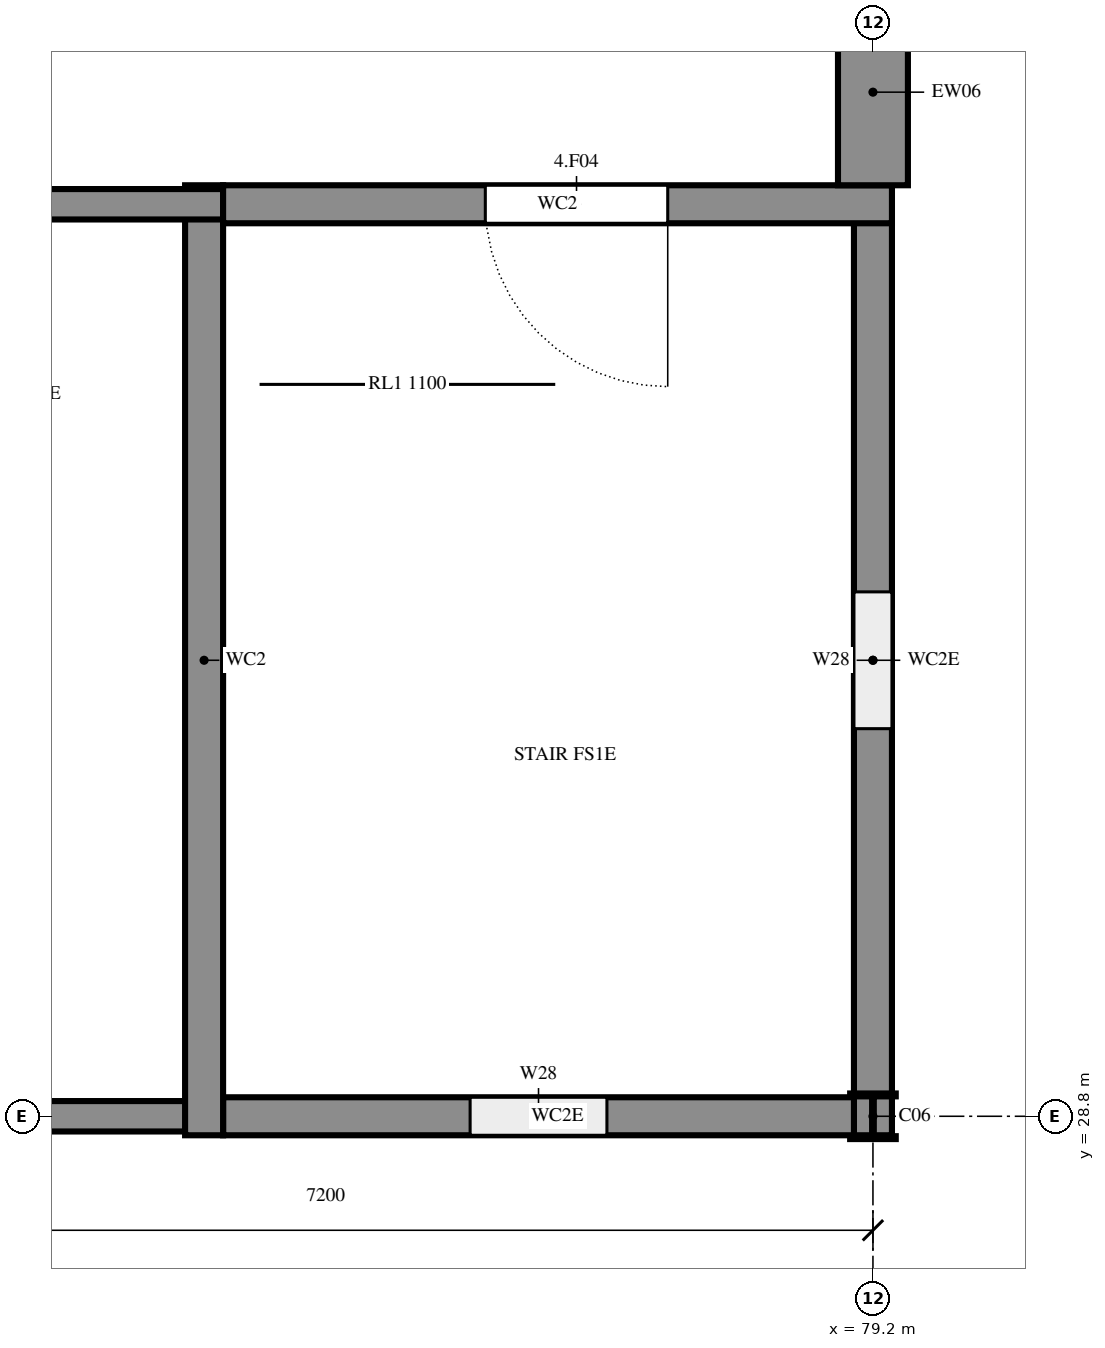
"""IFC4 building model, lengths in metres.
Left out: names, types, materials, properties, quantities, classifications, styles, units other than length and angle.
Written with IfcOpenShell. Run it as: python <this file> out.ifc"""

import sys

from ifc_helpers import new_model, si_unit, direction, frame, frame_2d, origin, origin_2d, place, context, subcontext, project, spatial, rectangle, i_section, extrude, element, fill, save


model = new_model("IFC4")
c1 = context("Model", 3, precision=1e-05, world=origin(), true_north=direction((0.0, 1.0)))
c2 = subcontext(c1, "Body", "Model", "MODEL_VIEW")
j1 = project(units=[si_unit("LENGTHUNIT", "METRE"), si_unit("PLANEANGLEUNIT", "RADIAN")], contexts=[c1])
p1 = place(None, origin())
s1 = spatial("IfcSite", under=j1, at=p1, CompositionType="ELEMENT")
p2 = place(p1, origin())
s2 = spatial("IfcBuilding", under=s1, at=p2, CompositionType="ELEMENT")
p3 = place(p2, frame((0.0, 0.0, 14.4)))
s3 = spatial("IfcBuildingStorey", under=s2, at=p3, CompositionType="ELEMENT", Elevation=14.4)
p4 = place(p3, frame((79.2, 28.8, 0.0), z_axis=(0.0, 0.0, 1.0), x_axis=(1.0, 0.0, 0.0)))
e1 = element("IfcColumn", 1, at=p4, inside=s3, PredefinedType="COLUMN", context=c2, shape_type="SweptSolid", body=[
    extrude(i_section(OverallWidth=0.3, OverallDepth=0.3, WebThickness=0.011, FlangeThickness=0.019, FilletRadius=0.027, at=origin_2d()), origin(), (0.0, 0.0, 1.0), 3.6),
])
p5 = place(p3, frame((71.9, 28.8, 0.0), z_axis=(0.0, 0.0, 1.0), x_axis=(1.0, 0.0, 0.0)))
e2 = element("IfcWall", 2, at=p5, inside=s3, PredefinedType="SHEAR", context=c2, shape_type="SweptSolid", body=[
    extrude(rectangle(XDim=3.025, YDim=0.2, at=frame_2d((1.513, 0.0))), origin(), (0.0, 0.0, 1.0), 3.6),
])
p6 = place(p3, frame((74.925, 28.8, 0.0), z_axis=(0.0, 0.0, 1.0), x_axis=(1.0, 0.0, 0.0)))
e3 = element("IfcWall", 3, at=p6, inside=s3, PredefinedType="SHEAR", context=c2, shape_type="SweptSolid", body=[
    extrude(rectangle(XDim=4.4, YDim=0.25, at=frame_2d((2.2, 0.0))), origin(), (0.0, 0.0, 1.0), 3.6),
])
p7 = place(p6, frame((1.625, 0.0, 0.6)))
e4 = element("IfcOpeningElement", 4, at=p7, cuts=e3, PredefinedType="OPENING", context=c2, shape_type="SweptSolid", body=[
    extrude(rectangle(XDim=0.9, YDim=2.1, at=frame_2d((0.45, 1.05))), frame((0.0, 0.135, 0.0), z_axis=(0.0, -1.0, 0.0), x_axis=(1.0, 0.0, 0.0)), (0.0, 0.0, 1.0), 0.27),
])
p8 = place(p3, frame((79.2, 28.675, 0.0), z_axis=(0.0, 0.0, 1.0), x_axis=(0.0, 1.0, 0.0)))
e5 = element("IfcWall", 5, at=p8, inside=s3, PredefinedType="SHEAR", context=c2, shape_type="SweptSolid", body=[
    extrude(rectangle(XDim=6.25, YDim=0.25, at=frame_2d((3.125, 0.0))), origin(), (0.0, 0.0, 1.0), 3.6),
])
p9 = place(p8, frame((2.675, 0.0, 0.6)))
e6 = element("IfcOpeningElement", 6, at=p9, cuts=e5, PredefinedType="OPENING", context=c2, shape_type="SweptSolid", body=[
    extrude(rectangle(XDim=0.9, YDim=2.1, at=frame_2d((0.45, 1.05))), frame((0.0, 0.135, 0.0), z_axis=(0.0, -1.0, 0.0), x_axis=(1.0, 0.0, 0.0)), (0.0, 0.0, 1.0), 0.27),
])
p10 = place(p3, frame((74.8, 34.925, 0.0), z_axis=(0.0, 0.0, 1.0), x_axis=(0.0, -1.0, 0.0)))
e7 = element("IfcWall", 7, at=p10, inside=s3, PredefinedType="SHEAR", context=c2, shape_type="SweptSolid", body=[
    extrude(rectangle(XDim=6.25, YDim=0.25, at=frame_2d((3.125, 0.0))), origin(), (0.0, 0.0, 1.0), 3.6),
])
p11 = place(p3, frame((74.925, 34.8, 0.0), z_axis=(0.0, 0.0, 1.0), x_axis=(-1.0, 0.0, 0.0)))
e8 = element("IfcWall", 8, at=p11, inside=s3, PredefinedType="SHEAR", context=c2, shape_type="SweptSolid", body=[
    extrude(rectangle(XDim=3.025, YDim=0.2, at=frame_2d((1.513, 0.0))), origin(), (0.0, 0.0, 1.0), 3.6),
])
p12 = place(p3, frame((79.325, 34.8, 0.0), z_axis=(0.0, 0.0, 1.0), x_axis=(-1.0, 0.0, 0.0)))
e9 = element("IfcWall", 9, at=p12, inside=s3, PredefinedType="SHEAR", context=c2, shape_type="SweptSolid", body=[
    extrude(rectangle(XDim=4.4, YDim=0.25, at=frame_2d((2.2, 0.0))), origin(), (0.0, 0.0, 1.0), 3.6),
])
p13 = place(p12, frame((1.475, 0.0, 0.0)))
e10 = element("IfcOpeningElement", 10, at=p13, cuts=e9, PredefinedType="OPENING", context=c2, shape_type="SweptSolid", body=[
    extrude(rectangle(XDim=1.2, YDim=2.4, at=frame_2d((0.6, 1.2))), frame((0.0, 0.135, 0.0), z_axis=(0.0, -1.0, 0.0), x_axis=(1.0, 0.0, 0.0)), (0.0, 0.0, 1.0), 0.27),
])
p14 = place(p3, frame((79.2, 34.925, 0.0), z_axis=(0.0, 0.0, 1.0), x_axis=(0.0, 1.0, 0.0)))
e11 = element("IfcWall", 11, at=p14, inside=s3, PredefinedType="SOLIDWALL", context=c2, shape_type="SweptSolid", body=[
    extrude(rectangle(XDim=1.225, YDim=0.46, at=frame_2d((0.612, 0.0))), origin(), (0.0, 0.0, 1.0), 3.22),
])
p15 = place(p9, origin())
e12 = element("IfcWindow", 12, at=p15, inside=s3, PartitioningType="SINGLE_PANEL", PredefinedType="WINDOW", context=c2, shape_type="SweptSolid", body=[
    extrude(rectangle(XDim=0.9, YDim=2.1, at=frame_2d((0.45, 1.05))), frame((0.0, 0.03, 0.0), z_axis=(0.0, -1.0, 0.0), x_axis=(1.0, 0.0, 0.0)), (0.0, 0.0, 1.0), 0.06),
])
fill(e6, e12)
p16 = place(p7, origin())
e13 = element("IfcWindow", 13, at=p16, inside=s3, PartitioningType="SINGLE_PANEL", PredefinedType="WINDOW", context=c2, shape_type="SweptSolid", body=[
    extrude(rectangle(XDim=0.9, YDim=2.1, at=frame_2d((0.45, 1.05))), frame((0.0, 0.03, 0.0), z_axis=(0.0, -1.0, 0.0), x_axis=(1.0, 0.0, 0.0)), (0.0, 0.0, 1.0), 0.06),
])
fill(e4, e13)
p17 = place(p13, origin())
e14 = element("IfcDoor", 14, at=p17, inside=s3, OperationType="SINGLE_SWING_RIGHT", PredefinedType="DOOR", context=c2, shape_type="SweptSolid", body=[
    extrude(rectangle(XDim=1.2, YDim=2.4, at=frame_2d((0.6, 1.2))), frame((0.0, 0.025, 0.0), z_axis=(0.0, -1.0, 0.0), x_axis=(1.0, 0.0, 0.0)), (0.0, 0.0, 1.0), 0.05),
])
fill(e10, e14)
save(model, sys.argv[1])
